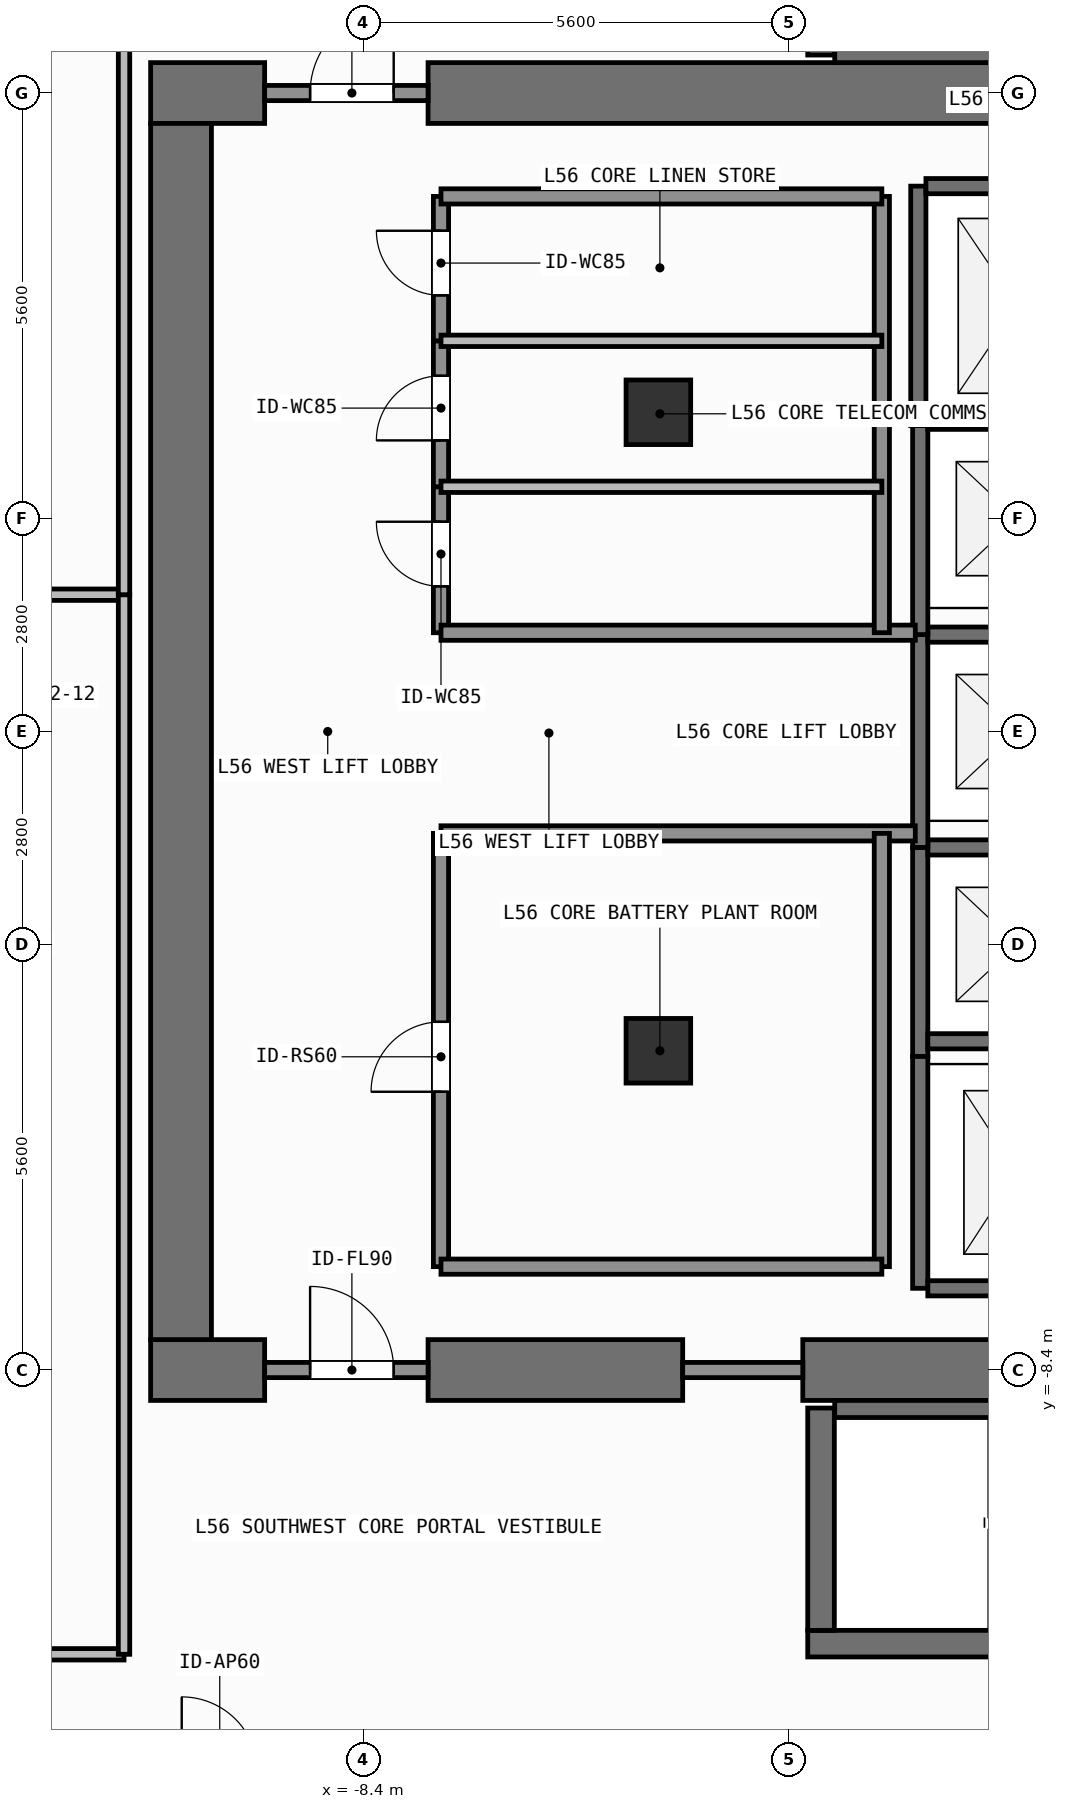
"""IFC4 building model, lengths in metres.
Left out: names, types, materials, properties, quantities, classifications, styles, units other than length and angle.
Written with IfcOpenShell. Run it as: python <this file> out.ifc"""

import sys

from ifc_helpers import new_model, si_unit, direction, frame, frame_2d, origin, origin_2d, place, context, subcontext, project, spatial, rectangle, extrude, element, fill, save


model = new_model("IFC4")
c1 = context("Model", 3, precision=1e-05, world=origin(), true_north=direction((0.0, 1.0)))
c2 = subcontext(c1, "Body", "Model", "MODEL_VIEW")
j1 = project(units=[si_unit("LENGTHUNIT", "METRE"), si_unit("PLANEANGLEUNIT", "RADIAN")], contexts=[c1])
p1 = place(None, origin())
s1 = spatial("IfcSite", under=j1, at=p1, CompositionType="ELEMENT")
p2 = place(p1, origin())
s2 = spatial("IfcBuilding", under=s1, at=p2, CompositionType="ELEMENT")
p3 = place(p2, frame((0.0, 0.0, 227.4)))
s3 = spatial("IfcBuildingStorey", under=s2, at=p3, CompositionType="ELEMENT", Elevation=227.4)
p4 = place(p3, frame((-11.2, -8.4, 0.0), z_axis=(0.0, 0.0, 1.0), x_axis=(1.0, 0.0, 0.0)))
e1 = element("IfcWall", 1, at=p4, inside=s3, PredefinedType="SHEAR", context=c2, shape_type="SweptSolid", body=[
    extrude(rectangle(XDim=1.5, YDim=0.8, at=frame_2d((0.75, 0.0))), origin(), (0.0, 0.0, 1.0), 3.9),
])
p5 = place(p3, frame((-7.55, -8.4, 0.0), z_axis=(0.0, 0.0, 1.0), x_axis=(1.0, 0.0, 0.0)))
e2 = element("IfcWall", 2, at=p5, inside=s3, PredefinedType="SHEAR", context=c2, shape_type="SweptSolid", body=[
    extrude(rectangle(XDim=3.35, YDim=0.8, at=frame_2d((1.675, 0.0))), origin(), (0.0, 0.0, 1.0), 3.9),
])
p6 = place(p3, frame((-2.62, -8.4, 0.0), z_axis=(0.0, 0.0, 1.0), x_axis=(1.0, 0.0, 0.0)))
e3 = element("IfcWall", 3, at=p6, inside=s3, PredefinedType="SHEAR", context=c2, shape_type="SweptSolid", body=[
    extrude(rectangle(XDim=7.27, YDim=0.8, at=frame_2d((3.635, 0.0))), origin(), (0.0, 0.0, 1.0), 3.9),
])
p7 = place(p3, frame((-11.2, 8.4, 0.0), z_axis=(0.0, 0.0, 1.0), x_axis=(1.0, 0.0, 0.0)))
e4 = element("IfcWall", 4, at=p7, inside=s3, PredefinedType="SHEAR", context=c2, shape_type="SweptSolid", body=[
    extrude(rectangle(XDim=1.5, YDim=0.8, at=frame_2d((0.75, 0.0))), origin(), (0.0, 0.0, 1.0), 3.9),
])
p8 = place(p3, frame((-7.55, 8.4, 0.0), z_axis=(0.0, 0.0, 1.0), x_axis=(1.0, 0.0, 0.0)))
e5 = element("IfcWall", 5, at=p8, inside=s3, PredefinedType="SHEAR", context=c2, shape_type="SweptSolid", body=[
    extrude(rectangle(XDim=16.35, YDim=0.8, at=frame_2d((8.175, 0.0))), origin(), (0.0, 0.0, 1.0), 3.9),
])
p9 = place(p3, frame((-10.8, -8.0, 0.0), z_axis=(0.0, 0.0, 1.0), x_axis=(0.0, 1.0, 0.0)))
e6 = element("IfcWall", 6, at=p9, inside=s3, PredefinedType="SHEAR", context=c2, shape_type="SweptSolid", body=[
    extrude(rectangle(XDim=16.0, YDim=0.8, at=frame_2d((8.0, 0.0))), origin(), (0.0, 0.0, 1.0), 3.9),
])
p10 = place(p3, frame((-2.555, -12.0, 0.0), z_axis=(0.0, 0.0, 1.0), x_axis=(1.0, 0.0, 0.0)))
e7 = element("IfcWall", 7, at=p10, inside=s3, PredefinedType="SHEAR", context=c2, shape_type="SweptSolid", body=[
    extrude(rectangle(XDim=7.31, YDim=0.35, at=frame_2d((3.655, 0.0))), origin(), (0.0, 0.0, 1.0), 3.9),
])
p11 = place(p3, frame((-2.2, -8.913, 0.0), z_axis=(0.0, 0.0, 1.0), x_axis=(1.0, 0.0, 0.0)))
e8 = element("IfcWall", 8, at=p11, inside=s3, PredefinedType="SHEAR", context=c2, shape_type="SweptSolid", body=[
    extrude(rectangle(XDim=6.6, YDim=0.225, at=frame_2d((3.3, 0.0))), origin(), (0.0, 0.0, 1.0), 3.9),
])
p12 = place(p3, frame((-2.38, -11.825, 0.0), z_axis=(0.0, 0.0, 1.0), x_axis=(0.0, 1.0, 0.0)))
e9 = element("IfcWall", 9, at=p12, inside=s3, PredefinedType="SHEAR", context=c2, shape_type="SweptSolid", body=[
    extrude(rectangle(XDim=2.925, YDim=0.35, at=frame_2d((1.462, 0.0))), origin(), (0.0, 0.0, 1.0), 3.9),
])
p13 = place(p3, frame((-2.2, 8.913, 0.0), z_axis=(0.0, 0.0, 1.0), x_axis=(1.0, 0.0, 0.0)))
e10 = element("IfcWall", 10, at=p13, inside=s3, PredefinedType="SHEAR", context=c2, shape_type="SweptSolid", body=[
    extrude(rectangle(XDim=6.6, YDim=0.225, at=frame_2d((3.3, 0.0))), origin(), (0.0, 0.0, 1.0), 3.9),
])
p14 = place(p3, frame((-2.38, 8.9, 0.0), z_axis=(0.0, 0.0, 1.0), x_axis=(0.0, 1.0, 0.0)))
e11 = element("IfcWall", 11, at=p14, inside=s3, PredefinedType="SHEAR", context=c2, shape_type="SweptSolid", body=[
    extrude(rectangle(XDim=2.925, YDim=0.35, at=frame_2d((1.462, 0.0))), origin(), (0.0, 0.0, 1.0), 3.9),
])
for number, where, z_axis, x_axis in (
    (12, (-4.52, -4.2, 0.0), (0.0, 0.0, 1.0), (1.0, 0.0, 0.0)),
    (13, (-4.52, 4.2, 0.0), (0.0, 0.0, 1.0), (1.0, 0.0, 0.0)),
):
    element("IfcColumn", number, at=place(p3, frame(where, z_axis=z_axis, x_axis=x_axis)), inside=s3, PredefinedType="COLUMN", context=c2, shape_type="SweptSolid", body=[
        extrude(rectangle(XDim=0.85, YDim=0.85, at=origin_2d()), origin(), (0.0, 0.0, 1.0), 3.9),
    ])
p15 = place(p3, frame((-1.075, -4.275, 0.0), z_axis=(0.0, 0.0, 1.0), x_axis=(0.0, 1.0, 0.0)))
e14 = element("IfcWall", 14, at=p15, inside=s3, PredefinedType="SHEAR", context=c2, shape_type="SweptSolid", body=[
    extrude(rectangle(XDim=2.75, YDim=0.2, at=frame_2d((1.375, 0.0))), origin(), (0.0, 0.0, 1.0), 3.68),
])
for number, where, z_axis, x_axis in (
    (15, (-0.975, -4.075, 0.0), (0.0, 0.0, 1.0), (1.0, 0.0, 0.0)),
    (16, (-0.975, -1.525, 0.0), (0.0, 0.0, 1.0), (1.0, 0.0, 0.0)),
):
    element("IfcWall", number, at=place(p3, frame(where, z_axis=z_axis, x_axis=x_axis)), inside=s3, PredefinedType="SHEAR", context=c2, shape_type="SweptSolid", body=[
        extrude(rectangle(XDim=2.35, YDim=0.2, at=frame_2d((1.175, 0.0))), origin(), (0.0, 0.0, 1.0), 3.68),
    ])
p16 = place(p3, frame((-1.075, -1.525, 0.0), z_axis=(0.0, 0.0, 1.0), x_axis=(0.0, 1.0, 0.0)))
e17 = element("IfcWall", 17, at=p16, inside=s3, PredefinedType="SHEAR", context=c2, shape_type="SweptSolid", body=[
    extrude(rectangle(XDim=2.8, YDim=0.2, at=frame_2d((1.4, 0.0))), origin(), (0.0, 0.0, 1.0), 3.68),
])
p17 = place(p3, frame((-0.975, 1.275, 0.0), z_axis=(0.0, 0.0, 1.0), x_axis=(1.0, 0.0, 0.0)))
e18 = element("IfcWall", 18, at=p17, inside=s3, PredefinedType="SHEAR", context=c2, shape_type="SweptSolid", body=[
    extrude(rectangle(XDim=2.35, YDim=0.2, at=frame_2d((1.175, 0.0))), origin(), (0.0, 0.0, 1.0), 3.68),
])
p18 = place(p3, frame((-1.075, 1.275, 0.0), z_axis=(0.0, 0.0, 1.0), x_axis=(0.0, 1.0, 0.0)))
e19 = element("IfcWall", 19, at=p18, inside=s3, PredefinedType="SHEAR", context=c2, shape_type="SweptSolid", body=[
    extrude(rectangle(XDim=2.8, YDim=0.2, at=frame_2d((1.4, 0.0))), origin(), (0.0, 0.0, 1.0), 3.68),
])
p19 = place(p3, frame((-0.975, 4.075, 0.0), z_axis=(0.0, 0.0, 1.0), x_axis=(1.0, 0.0, 0.0)))
e20 = element("IfcWall", 20, at=p19, inside=s3, PredefinedType="SHEAR", context=c2, shape_type="SweptSolid", body=[
    extrude(rectangle(XDim=2.35, YDim=0.2, at=frame_2d((1.175, 0.0))), origin(), (0.0, 0.0, 1.0), 3.68),
])
p20 = place(p3, frame((-1.1, 4.025, 0.0), z_axis=(0.0, 0.0, 1.0), x_axis=(0.0, 1.0, 0.0)))
e21 = element("IfcWall", 21, at=p20, inside=s3, PredefinedType="SHEAR", context=c2, shape_type="SweptSolid", body=[
    extrude(rectangle(XDim=3.15, YDim=0.2, at=frame_2d((1.575, 0.0))), origin(), (0.0, 0.0, 1.0), 3.68),
])
p21 = place(p3, frame((-1.0, 7.175, 0.0), z_axis=(0.0, 0.0, 1.0), x_axis=(1.0, 0.0, 0.0)))
e22 = element("IfcWall", 22, at=p21, inside=s3, PredefinedType="SHEAR", context=c2, shape_type="SweptSolid", body=[
    extrude(rectangle(XDim=2.4, YDim=0.2, at=frame_2d((1.2, 0.0))), origin(), (0.0, 0.0, 1.0), 3.68),
])
p22 = place(p3, frame((-1.075, -7.325, 0.0), z_axis=(0.0, 0.0, 1.0), x_axis=(0.0, 1.0, 0.0)))
e23 = element("IfcWall", 23, at=p22, inside=s3, PredefinedType="SHEAR", context=c2, shape_type="SweptSolid", body=[
    extrude(rectangle(XDim=3.05, YDim=0.2, at=frame_2d((1.525, 0.0))), origin(), (0.0, 0.0, 1.0), 3.68),
])
p23 = place(p3, frame((-0.975, -7.325, 0.0), z_axis=(0.0, 0.0, 1.0), x_axis=(1.0, 0.0, 0.0)))
e24 = element("IfcWall", 24, at=p23, inside=s3, PredefinedType="SHEAR", context=c2, shape_type="SweptSolid", body=[
    extrude(rectangle(XDim=2.35, YDim=0.2, at=frame_2d((1.175, 0.0))), origin(), (0.0, 0.0, 1.0), 3.68),
])
p24 = place(p3, frame((-9.7, -8.4, 0.0), z_axis=(0.0, 0.0, 1.0), x_axis=(1.0, 0.0, 0.0)))
e25 = element("IfcWall", 25, at=p24, inside=s3, PredefinedType="SOLIDWALL", context=c2, shape_type="SweptSolid", body=[
    extrude(rectangle(XDim=2.15, YDim=0.2, at=frame_2d((1.075, 0.0))), origin(), (0.0, 0.0, 1.0), 2.82),
])
p25 = place(p24, frame((0.598, 0.0, 0.0)))
e26 = element("IfcOpeningElement", 26, at=p25, cuts=e25, PredefinedType="OPENING", context=c2, shape_type="SweptSolid", body=[
    extrude(rectangle(XDim=1.1, YDim=2.15, at=frame_2d((0.55, 1.075))), frame((0.0, 0.11, 0.0), z_axis=(0.0, -1.0, 0.0), x_axis=(1.0, 0.0, 0.0)), (0.0, 0.0, 1.0), 0.22),
])
p26 = place(p3, frame((-9.7, 8.4, 0.0), z_axis=(0.0, 0.0, 1.0), x_axis=(1.0, 0.0, 0.0)))
e27 = element("IfcWall", 27, at=p26, inside=s3, PredefinedType="SOLIDWALL", context=c2, shape_type="SweptSolid", body=[
    extrude(rectangle(XDim=2.15, YDim=0.2, at=frame_2d((1.075, 0.0))), origin(), (0.0, 0.0, 1.0), 2.82),
])
p27 = place(p26, frame((0.598, 0.0, 0.0)))
e28 = element("IfcOpeningElement", 28, at=p27, cuts=e27, PredefinedType="OPENING", context=c2, shape_type="SweptSolid", body=[
    extrude(rectangle(XDim=1.1, YDim=2.15, at=frame_2d((0.55, 1.075))), frame((0.0, 0.11, 0.0), z_axis=(0.0, -1.0, 0.0), x_axis=(1.0, 0.0, 0.0)), (0.0, 0.0, 1.0), 0.22),
])
p28 = place(p3, frame((-7.38, -7.04, 0.0), z_axis=(0.0, 0.0, 1.0), x_axis=(0.0, 1.0, 0.0)))
e29 = element("IfcWall", 29, at=p28, inside=s3, PredefinedType="SOLIDWALL", context=c2, shape_type="SweptSolid", body=[
    extrude(rectangle(XDim=5.7, YDim=0.2, at=frame_2d((2.85, 0.0))), origin(), (0.0, 0.0, 1.0), 3.68),
])
p29 = place(p28, frame((2.301, 0.0, 0.0)))
e30 = element("IfcOpeningElement", 30, at=p29, cuts=e29, PredefinedType="OPENING", context=c2, shape_type="SweptSolid", body=[
    extrude(rectangle(XDim=0.92, YDim=2.1, at=frame_2d((0.46, 1.05))), frame((0.0, 0.11, 0.0), z_axis=(0.0, -1.0, 0.0), x_axis=(1.0, 0.0, 0.0)), (0.0, 0.0, 1.0), 0.22),
])
p30 = place(p3, frame((-7.38, 1.3, 0.0), z_axis=(0.0, 0.0, 1.0), x_axis=(0.0, 1.0, 0.0)))
e31 = element("IfcWall", 31, at=p30, inside=s3, PredefinedType="SOLIDWALL", context=c2, shape_type="SweptSolid", body=[
    extrude(rectangle(XDim=1.92, YDim=0.2, at=frame_2d((0.96, 0.0))), origin(), (0.0, 0.0, 1.0), 3.68),
])
p31 = place(p30, frame((0.61, 0.0, 0.0)))
e32 = element("IfcOpeningElement", 32, at=p31, cuts=e31, PredefinedType="OPENING", context=c2, shape_type="SweptSolid", body=[
    extrude(rectangle(XDim=0.85, YDim=2.1, at=frame_2d((0.425, 1.05))), frame((0.0, 0.11, 0.0), z_axis=(0.0, -1.0, 0.0), x_axis=(1.0, 0.0, 0.0)), (0.0, 0.0, 1.0), 0.22),
])
p32 = place(p3, frame((-7.38, 3.22, 0.0), z_axis=(0.0, 0.0, 1.0), x_axis=(0.0, 1.0, 0.0)))
e33 = element("IfcWall", 33, at=p32, inside=s3, PredefinedType="SOLIDWALL", context=c2, shape_type="SweptSolid", body=[
    extrude(rectangle(XDim=1.92, YDim=0.2, at=frame_2d((0.96, 0.0))), origin(), (0.0, 0.0, 1.0), 3.68),
])
p33 = place(p32, frame((0.61, 0.0, 0.0)))
e34 = element("IfcOpeningElement", 34, at=p33, cuts=e33, PredefinedType="OPENING", context=c2, shape_type="SweptSolid", body=[
    extrude(rectangle(XDim=0.85, YDim=2.1, at=frame_2d((0.425, 1.05))), frame((0.0, 0.11, 0.0), z_axis=(0.0, -1.0, 0.0), x_axis=(1.0, 0.0, 0.0)), (0.0, 0.0, 1.0), 0.22),
])
p34 = place(p3, frame((-7.38, 5.14, 0.0), z_axis=(0.0, 0.0, 1.0), x_axis=(0.0, 1.0, 0.0)))
e35 = element("IfcWall", 35, at=p34, inside=s3, PredefinedType="SOLIDWALL", context=c2, shape_type="SweptSolid", body=[
    extrude(rectangle(XDim=1.9, YDim=0.2, at=frame_2d((0.95, 0.0))), origin(), (0.0, 0.0, 1.0), 3.68),
])
p35 = place(p34, frame((0.598, 0.0, 0.0)))
e36 = element("IfcOpeningElement", 36, at=p35, cuts=e35, PredefinedType="OPENING", context=c2, shape_type="SweptSolid", body=[
    extrude(rectangle(XDim=0.85, YDim=2.1, at=frame_2d((0.425, 1.05))), frame((0.0, 0.11, 0.0), z_axis=(0.0, -1.0, 0.0), x_axis=(1.0, 0.0, 0.0)), (0.0, 0.0, 1.0), 0.22),
])
p36 = place(p3, frame((-18.33, -12.14, 0.0), z_axis=(0.0, 0.0, 1.0), x_axis=(1.0, 0.0, 0.0)))
e37 = element("IfcWall", 37, at=p36, inside=s3, PredefinedType="PARTITIONING", context=c2, shape_type="SweptSolid", body=[
    extrude(rectangle(XDim=6.78, YDim=0.15, at=frame_2d((3.39, 0.0))), origin(), (0.0, 0.0, 1.0), 3.68),
])
p37 = place(p36, frame((2.85, 0.0, 0.0)))
e38 = element("IfcOpeningElement", 38, at=p37, cuts=e37, PredefinedType="OPENING", context=c2, shape_type="SweptSolid", body=[
    extrude(rectangle(XDim=0.9, YDim=2.1, at=frame_2d((0.45, 1.05))), frame((0.0, 0.085, 0.0), z_axis=(0.0, -1.0, 0.0), x_axis=(1.0, 0.0, 0.0)), (0.0, 0.0, 1.0), 0.17),
])
p38 = place(p3, frame((-4.2, -8.4, 0.0), z_axis=(0.0, 0.0, 1.0), x_axis=(1.0, 0.0, 0.0)))
e39 = element("IfcWall", 39, at=p38, inside=s3, PredefinedType="SOLIDWALL", context=c2, shape_type="SweptSolid", body=[
    extrude(rectangle(XDim=1.58, YDim=0.2, at=frame_2d((0.79, 0.0))), origin(), (0.0, 0.0, 1.0), 2.82),
])
for number, where, z_axis, x_axis in (
    (40, (-7.38, -1.34, 0.0), (0.0, 0.0, 1.0), (1.0, 0.0, 0.0)),
    (41, (-7.38, 1.3, 0.0), (0.0, 0.0, 1.0), (1.0, 0.0, 0.0)),
):
    element("IfcWall", number, at=place(p3, frame(where, z_axis=z_axis, x_axis=x_axis)), inside=s3, PredefinedType="SOLIDWALL", context=c2, shape_type="SweptSolid", body=[
        extrude(rectangle(XDim=6.24, YDim=0.2, at=frame_2d((3.12, 0.0))), origin(), (0.0, 0.0, 1.0), 3.68),
    ])
p39 = place(p3, frame((-1.58, -7.04, 0.0), z_axis=(0.0, 0.0, 1.0), x_axis=(0.0, 1.0, 0.0)))
e42 = element("IfcWall", 42, at=p39, inside=s3, PredefinedType="SOLIDWALL", context=c2, shape_type="SweptSolid", body=[
    extrude(rectangle(XDim=5.7, YDim=0.2, at=frame_2d((2.85, 0.0))), origin(), (0.0, 0.0, 1.0), 3.68),
])
p40 = place(p3, frame((-7.38, -7.04, 0.0), z_axis=(0.0, 0.0, 1.0), x_axis=(1.0, 0.0, 0.0)))
e43 = element("IfcWall", 43, at=p40, inside=s3, PredefinedType="SOLIDWALL", context=c2, shape_type="SweptSolid", body=[
    extrude(rectangle(XDim=5.8, YDim=0.2, at=frame_2d((2.9, 0.0))), origin(), (0.0, 0.0, 1.0), 3.68),
])
p41 = place(p3, frame((-1.58, 1.3, 0.0), z_axis=(0.0, 0.0, 1.0), x_axis=(0.0, 1.0, 0.0)))
e44 = element("IfcWall", 44, at=p41, inside=s3, PredefinedType="SOLIDWALL", context=c2, shape_type="SweptSolid", body=[
    extrude(rectangle(XDim=5.74, YDim=0.2, at=frame_2d((2.87, 0.0))), origin(), (0.0, 0.0, 1.0), 3.68),
])
p42 = place(p3, frame((-7.38, 7.04, 0.0), z_axis=(0.0, 0.0, 1.0), x_axis=(1.0, 0.0, 0.0)))
e45 = element("IfcWall", 45, at=p42, inside=s3, PredefinedType="SOLIDWALL", context=c2, shape_type="SweptSolid", body=[
    extrude(rectangle(XDim=5.8, YDim=0.2, at=frame_2d((2.9, 0.0))), origin(), (0.0, 0.0, 1.0), 3.68),
])
for number, where, z_axis, x_axis in (
    (46, (-7.38, 3.22, 0.0), (0.0, 0.0, 1.0), (1.0, 0.0, 0.0)),
    (47, (-7.38, 5.14, 0.0), (0.0, 0.0, 1.0), (1.0, 0.0, 0.0)),
):
    element("IfcWall", number, at=place(p3, frame(where, z_axis=z_axis, x_axis=x_axis)), inside=s3, PredefinedType="PARTITIONING", context=c2, shape_type="SweptSolid", body=[
        extrude(rectangle(XDim=5.8, YDim=0.15, at=frame_2d((2.9, 0.0))), origin(), (0.0, 0.0, 1.0), 3.68),
    ])
p43 = place(p3, frame((-18.33, 1.8, 0.0), z_axis=(0.0, 0.0, 1.0), x_axis=(1.0, 0.0, 0.0)))
e48 = element("IfcWall", 48, at=p43, inside=s3, PredefinedType="PARTITIONING", context=c2, shape_type="SweptSolid", body=[
    extrude(rectangle(XDim=6.78, YDim=0.15, at=frame_2d((3.39, 0.0))), origin(), (0.0, 0.0, 1.0), 3.68),
])
p44 = place(p3, frame((-11.55, -12.14, 0.0), z_axis=(0.0, 0.0, 1.0), x_axis=(0.0, 1.0, 0.0)))
e49 = element("IfcWall", 49, at=p44, inside=s3, PredefinedType="PARTITIONING", context=c2, shape_type="SweptSolid", body=[
    extrude(rectangle(XDim=13.94, YDim=0.15, at=frame_2d((6.97, 0.0))), origin(), (0.0, 0.0, 1.0), 3.68),
])
p45 = place(p3, frame((-11.55, 1.8, 0.0), z_axis=(0.0, 0.0, 1.0), x_axis=(0.0, 1.0, 0.0)))
e50 = element("IfcWall", 50, at=p45, inside=s3, PredefinedType="PARTITIONING", context=c2, shape_type="SweptSolid", body=[
    extrude(rectangle(XDim=10.34, YDim=0.15, at=frame_2d((5.17, 0.0))), origin(), (0.0, 0.0, 1.0), 3.68),
])
p46 = place(p25, origin())
e51 = element("IfcDoor", 51, at=p46, inside=s3, OperationType="SINGLE_SWING_LEFT", PredefinedType="DOOR", context=c2, shape_type="SweptSolid", body=[
    extrude(rectangle(XDim=1.1, YDim=2.15, at=frame_2d((0.55, 1.075))), frame((0.0, 0.025, 0.0), z_axis=(0.0, -1.0, 0.0), x_axis=(1.0, 0.0, 0.0)), (0.0, 0.0, 1.0), 0.05),
])
fill(e26, e51)
p47 = place(p27, origin())
e52 = element("IfcDoor", 52, at=p47, inside=s3, OperationType="SINGLE_SWING_RIGHT", PredefinedType="DOOR", context=c2, shape_type="SweptSolid", body=[
    extrude(rectangle(XDim=1.1, YDim=2.15, at=frame_2d((0.55, 1.075))), frame((0.0, 0.025, 0.0), z_axis=(0.0, -1.0, 0.0), x_axis=(1.0, 0.0, 0.0)), (0.0, 0.0, 1.0), 0.05),
])
fill(e28, e52)
p48 = place(p29, origin())
e53 = element("IfcDoor", 53, at=p48, inside=s3, OperationType="SINGLE_SWING_LEFT", PredefinedType="DOOR", context=c2, shape_type="SweptSolid", body=[
    extrude(rectangle(XDim=0.92, YDim=2.1, at=frame_2d((0.46, 1.05))), frame((0.0, 0.025, 0.0), z_axis=(0.0, -1.0, 0.0), x_axis=(1.0, 0.0, 0.0)), (0.0, 0.0, 1.0), 0.05),
])
fill(e30, e53)
p49 = place(p31, origin())
e54 = element("IfcDoor", 54, at=p49, inside=s3, OperationType="SINGLE_SWING_RIGHT", PredefinedType="DOOR", context=c2, shape_type="SweptSolid", body=[
    extrude(rectangle(XDim=0.85, YDim=2.1, at=frame_2d((0.425, 1.05))), frame((0.0, 0.025, 0.0), z_axis=(0.0, -1.0, 0.0), x_axis=(1.0, 0.0, 0.0)), (0.0, 0.0, 1.0), 0.05),
])
fill(e32, e54)
p50 = place(p33, origin())
e55 = element("IfcDoor", 55, at=p50, inside=s3, OperationType="SINGLE_SWING_LEFT", PredefinedType="DOOR", context=c2, shape_type="SweptSolid", body=[
    extrude(rectangle(XDim=0.85, YDim=2.1, at=frame_2d((0.425, 1.05))), frame((0.0, 0.025, 0.0), z_axis=(0.0, -1.0, 0.0), x_axis=(1.0, 0.0, 0.0)), (0.0, 0.0, 1.0), 0.05),
])
fill(e34, e55)
p51 = place(p35, origin())
e56 = element("IfcDoor", 56, at=p51, inside=s3, OperationType="SINGLE_SWING_RIGHT", PredefinedType="DOOR", context=c2, shape_type="SweptSolid", body=[
    extrude(rectangle(XDim=0.85, YDim=2.1, at=frame_2d((0.425, 1.05))), frame((0.0, 0.025, 0.0), z_axis=(0.0, -1.0, 0.0), x_axis=(1.0, 0.0, 0.0)), (0.0, 0.0, 1.0), 0.05),
])
fill(e36, e56)
save(model, sys.argv[1])
